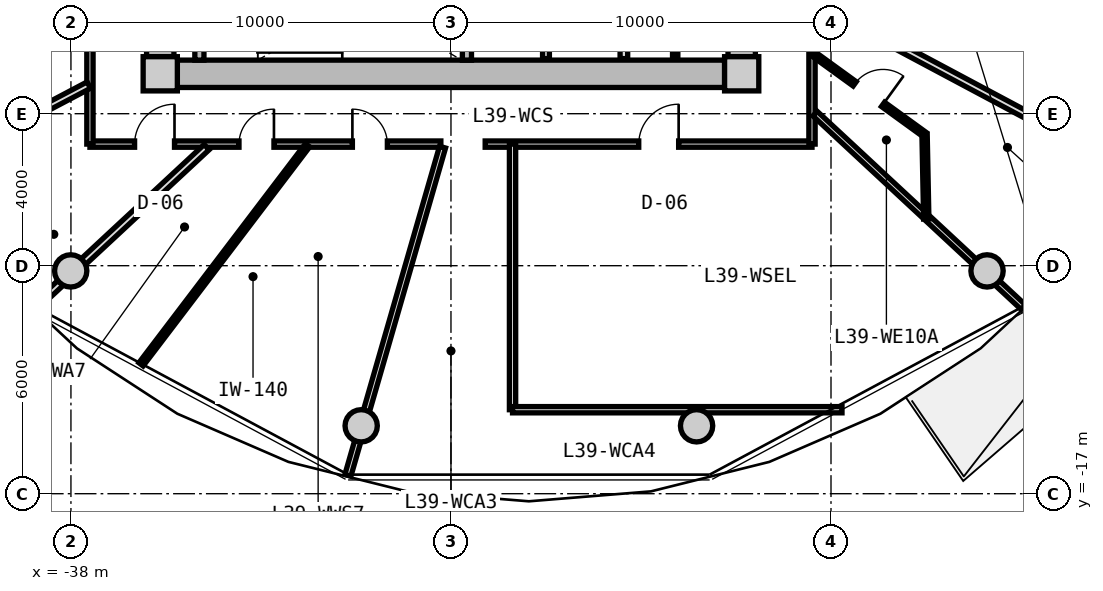
"""IFC4 building model, lengths in metres.
Left out: names, types, materials, properties, quantities, classifications, styles, units other than length and angle.
Written with IfcOpenShell. Run it as: python <this file> out.ifc"""

import sys

from ifc_helpers import new_model, si_unit, direction, frame, frame_2d, origin, origin_2d, place, context, subcontext, project, spatial, rectangle, circle, extrude, source, transform, mapped, element, fill, save


model = new_model("IFC4")
c1 = context("Model", 3, precision=1e-05, world=origin(), true_north=direction((0.0, 1.0)))
c2 = subcontext(c1, "Body", "Model", "MODEL_VIEW")
j1 = project(units=[si_unit("LENGTHUNIT", "METRE"), si_unit("PLANEANGLEUNIT", "RADIAN")], contexts=[c1])
p1 = place(None, origin())
s1 = spatial("IfcSite", under=j1, at=p1, CompositionType="ELEMENT")
p2 = place(p1, origin())
s2 = spatial("IfcBuilding", under=s1, at=p2, CompositionType="ELEMENT")
p3 = place(p2, frame((0.0, 0.0, 126.75)))
s3 = spatial("IfcBuildingStorey", under=s2, at=p3, CompositionType="ELEMENT", Elevation=126.75)
m1 = source(origin(), c2, "Body", "SweptSolid", [
    extrude(rectangle(XDim=0.9, YDim=0.9, at=origin_2d()), origin(), (0.0, 0.0, 1.0), 3.05),
])
for number, where, z_axis, x_axis in (
    (1, (-35.65, -5.95, 0.0), (0.0, 0.0, 1.0), (1.0, 0.0, 0.0)),
    (2, (-20.35, -5.95, 0.0), (0.0, 0.0, 1.0), (1.0, 0.0, 0.0)),
):
    element("IfcColumn", number, at=place(p3, frame(where, z_axis=z_axis, x_axis=x_axis)), inside=s3, PredefinedType="COLUMN", context=c2, shape_type="MappedRepresentation", body=[
        mapped(m1, transform((0.0, 0.0, 0.0), x_axis=(1.0, 0.0, 0.0), y_axis=(0.0, 1.0, 0.0), z_axis=(0.0, 0.0, 1.0), scale=1.0)),
    ])
m2 = source(origin(), c2, "Body", "SweptSolid", [
    extrude(rectangle(XDim=14.4, YDim=0.72, at=frame_2d((7.2, 0.0))), origin(), (0.0, 0.0, 1.0), 2.73),
])
p4 = place(p3, frame((-20.8, -5.95, 0.0), z_axis=(0.0, 0.0, 1.0), x_axis=(-1.0, 0.0, 0.0)))
e3 = element("IfcWall", 3, at=p4, inside=s3, PredefinedType="SHEAR", context=c2, shape_type="MappedRepresentation", body=[
    mapped(m2, transform((0.0, 0.0, 0.0), x_axis=(1.0, 0.0, 0.0), y_axis=(0.0, 1.0, 0.0), z_axis=(0.0, 0.0, 1.0), scale=1.0)),
])
m3 = source(origin(), c2, "Body", "SweptSolid", [
    extrude(rectangle(XDim=11.0, YDim=0.72, at=frame_2d((5.5, 0.0))), origin(), (0.0, 0.0, 1.0), 2.73),
])
p5 = place(p3, frame((-35.65, -5.5, 0.0), z_axis=(0.0, 0.0, 1.0), x_axis=(0.0, 1.0, 0.0)))
e4 = element("IfcWall", 4, at=p5, inside=s3, PredefinedType="SHEAR", context=c2, shape_type="MappedRepresentation", body=[
    mapped(m3, transform((0.0, 0.0, 0.0), x_axis=(1.0, 0.0, 0.0), y_axis=(0.0, 1.0, 0.0), z_axis=(0.0, 0.0, 1.0), scale=1.0)),
])
p6 = place(p5, frame((3.8, 0.0, 0.0)))
e5 = element("IfcOpeningElement", 5, at=p6, cuts=e4, PredefinedType="OPENING", context=c2, shape_type="SweptSolid", body=[
    extrude(rectangle(XDim=1.2, YDim=2.15, at=frame_2d((0.6, 1.075))), frame((0.0, 0.37, 0.0), z_axis=(0.0, -1.0, 0.0), x_axis=(1.0, 0.0, 0.0)), (0.0, 0.0, 1.0), 0.74),
])
p7 = place(p3, frame((-20.35, 5.5, 0.0), z_axis=(0.0, 0.0, 1.0), x_axis=(0.0, -1.0, 0.0)))
e6 = element("IfcWall", 6, at=p7, inside=s3, PredefinedType="SHEAR", context=c2, shape_type="MappedRepresentation", body=[
    mapped(m3, transform((0.0, 0.0, 0.0), x_axis=(1.0, 0.0, 0.0), y_axis=(0.0, 1.0, 0.0), z_axis=(0.0, 0.0, 1.0), scale=1.0)),
])
p8 = place(p7, frame((5.65, 0.0, 0.0)))
e7 = element("IfcOpeningElement", 7, at=p8, cuts=e6, PredefinedType="OPENING", context=c2, shape_type="SweptSolid", body=[
    extrude(rectangle(XDim=1.2, YDim=2.15, at=frame_2d((0.6, 1.075))), frame((0.0, 0.37, 0.0), z_axis=(0.0, -1.0, 0.0), x_axis=(1.0, 0.0, 0.0)), (0.0, 0.0, 1.0), 0.74),
])
m4 = source(origin(), c2, "Body", "SweptSolid", [
    extrude(circle(Radius=0.425, at=origin_2d()), origin(), (0.0, 0.0, 1.0), 3.05),
])
for number, where, z_axis, x_axis in (
    (8, (-38.006, -11.137, 0.0), (0.0, 0.0, 1.0), (1.0, 0.0, 0.0)),
    (9, (-30.363, -15.213, 0.0), (0.0, 0.0, 1.0), (1.0, 0.0, 0.0)),
    (10, (-21.537, -15.213, 0.0), (0.0, 0.0, 1.0), (1.0, 0.0, 0.0)),
    (11, (-13.894, -11.137, 0.0), (0.0, 0.0, 1.0), (1.0, 0.0, 0.0)),
):
    element("IfcColumn", number, at=place(p3, frame(where, z_axis=z_axis, x_axis=x_axis)), inside=s3, PredefinedType="COLUMN", context=c2, shape_type="MappedRepresentation", body=[
        mapped(m4, transform((0.0, 0.0, 0.0), x_axis=(1.0, 0.0, 0.0), y_axis=(0.0, 1.0, 0.0), z_axis=(0.0, 0.0, 1.0), scale=1.0)),
    ])
m5 = source(origin(), c2, "Body", "SweptSolid", [
    extrude(rectangle(XDim=3.14, YDim=0.24, at=frame_2d((1.57, 0.0))), origin(), (0.0, 0.0, 1.0), 2.73),
])
for number, where, z_axis, x_axis in (
    (12, (-34.62, -5.59, 0.0), (0.0, 0.0, 1.0), (0.0, 1.0, 0.0)),
    (13, (-27.58, -5.59, 0.0), (0.0, 0.0, 1.0), (0.0, 1.0, 0.0)),
):
    element("IfcWall", number, at=place(p3, frame(where, z_axis=z_axis, x_axis=x_axis)), inside=s3, PredefinedType="PARTITIONING", context=c2, shape_type="MappedRepresentation", body=[
        mapped(m5, transform((0.0, 0.0, 0.0), x_axis=(1.0, 0.0, 0.0), y_axis=(0.0, 1.0, 0.0), z_axis=(0.0, 0.0, 1.0), scale=1.0)),
    ])
m6 = source(origin(), c2, "Body", "SweptSolid", [
    extrude(rectangle(XDim=3.8, YDim=0.2, at=frame_2d((1.9, 0.0))), origin(), (0.0, 0.0, 1.0), 2.715),
])
p9 = place(p3, frame((-23.45, -5.55, 0.0), z_axis=(0.0, 0.0, 1.0), x_axis=(0.0, 1.0, 0.0)))
e14 = element("IfcWall", 14, at=p9, inside=s3, PredefinedType="PARTITIONING", context=c2, shape_type="MappedRepresentation", body=[
    mapped(m6, transform((0.0, 0.0, 0.0), x_axis=(1.0, 0.0, 0.0), y_axis=(0.0, 1.0, 0.0), z_axis=(0.0, 0.0, 1.0), scale=1.0)),
])
m7 = source(origin(), c2, "Body", "SweptSolid", [
    extrude(rectangle(XDim=3.22, YDim=0.18, at=frame_2d((1.61, 0.0))), origin(), (0.0, 0.0, 1.0), 2.715),
])
p10 = place(p3, frame((-25.5, -5.55, 0.0), z_axis=(0.0, 0.0, 1.0), x_axis=(0.0, 1.0, 0.0)))
e15 = element("IfcWall", 15, at=p10, inside=s3, PredefinedType="PARTITIONING", context=c2, shape_type="MappedRepresentation", body=[
    mapped(m7, transform((0.0, 0.0, 0.0), x_axis=(1.0, 0.0, 0.0), y_axis=(0.0, 1.0, 0.0), z_axis=(0.0, 0.0, 1.0), scale=1.0)),
])
m8 = source(origin(), c2, "Body", "SweptSolid", [
    extrude(rectangle(XDim=3.8, YDim=0.14, at=frame_2d((1.9, 0.0))), origin(), (0.0, 0.0, 1.0), 2.715),
])
p11 = place(p3, frame((-22.1, -5.55, 0.0), z_axis=(0.0, 0.0, 1.0), x_axis=(0.0, 1.0, 0.0)))
e16 = element("IfcWall", 16, at=p11, inside=s3, PredefinedType="PARTITIONING", context=c2, shape_type="MappedRepresentation", body=[
    mapped(m8, transform((0.0, 0.0, 0.0), x_axis=(1.0, 0.0, 0.0), y_axis=(0.0, 1.0, 0.0), z_axis=(0.0, 0.0, 1.0), scale=1.0)),
])
m9 = source(origin(), c2, "Body", "SweptSolid", [
    extrude(rectangle(XDim=8.6, YDim=0.165, at=frame_2d((4.3, 0.0))), origin(), (0.0, 0.0, 1.0), 2.715),
])
p12 = place(p3, frame((-18.5, -7.8, 0.0), z_axis=(0.0, 0.0, 1.0), x_axis=(-1.0, 0.0, 0.0)))
e17 = element("IfcWall", 17, at=p12, inside=s3, PredefinedType="PARTITIONING", context=c2, shape_type="MappedRepresentation", body=[
    mapped(m9, transform((0.0, 0.0, 0.0), x_axis=(1.0, 0.0, 0.0), y_axis=(0.0, 1.0, 0.0), z_axis=(0.0, 0.0, 1.0), scale=1.0)),
])
p13 = place(p12, frame((3.509, 0.0, 0.0)))
e18 = element("IfcOpeningElement", 18, at=p13, cuts=e17, PredefinedType="OPENING", context=c2, shape_type="SweptSolid", body=[
    extrude(rectangle(XDim=1.05, YDim=2.15, at=frame_2d((0.525, 1.075))), frame((0.0, 0.093, 0.0), z_axis=(0.0, -1.0, 0.0), x_axis=(1.0, 0.0, 0.0)), (0.0, 0.0, 1.0), 0.185),
])
m10 = source(origin(), c2, "Body", "SweptSolid", [
    extrude(rectangle(XDim=9.234, YDim=0.165, at=frame_2d((4.617, 0.0))), origin(), (0.0, 0.0, 1.0), 2.715),
])
p14 = place(p3, frame((-28.266, -7.8, 0.0), z_axis=(0.0, 0.0, 1.0), x_axis=(-1.0, 0.0, 0.0)))
e19 = element("IfcWall", 19, at=p14, inside=s3, PredefinedType="PARTITIONING", context=c2, shape_type="MappedRepresentation", body=[
    mapped(m10, transform((0.0, 0.0, 0.0), x_axis=(1.0, 0.0, 0.0), y_axis=(0.0, 1.0, 0.0), z_axis=(0.0, 0.0, 1.0), scale=1.0)),
])
p15 = place(p14, frame((7.009, 0.0, 0.0)))
e20 = element("IfcOpeningElement", 20, at=p15, cuts=e19, PredefinedType="OPENING", context=c2, shape_type="SweptSolid", body=[
    extrude(rectangle(XDim=1.05, YDim=2.15, at=frame_2d((0.525, 1.075))), frame((0.0, 0.093, 0.0), z_axis=(0.0, -1.0, 0.0), x_axis=(1.0, 0.0, 0.0)), (0.0, 0.0, 1.0), 0.185),
])
p16 = place(p14, frame((4.392, 0.0, 0.0)))
e21 = element("IfcOpeningElement", 21, at=p16, cuts=e19, PredefinedType="OPENING", context=c2, shape_type="SweptSolid", body=[
    extrude(rectangle(XDim=0.92, YDim=2.1, at=frame_2d((0.46, 1.05))), frame((0.0, 0.093, 0.0), z_axis=(0.0, -1.0, 0.0), x_axis=(1.0, 0.0, 0.0)), (0.0, 0.0, 1.0), 0.185),
])
p17 = place(p14, frame((1.408, 0.0, 0.0)))
e22 = element("IfcOpeningElement", 22, at=p17, cuts=e19, PredefinedType="OPENING", context=c2, shape_type="SweptSolid", body=[
    extrude(rectangle(XDim=0.92, YDim=2.1, at=frame_2d((0.46, 1.05))), frame((0.0, 0.093, 0.0), z_axis=(0.0, -1.0, 0.0), x_axis=(1.0, 0.0, 0.0)), (0.0, 0.0, 1.0), 0.185),
])
m11 = source(origin(), c2, "Body", "SweptSolid", [
    extrude(rectangle(XDim=15.6, YDim=0.165, at=frame_2d((7.8, 0.0))), origin(), (0.0, 0.0, 1.0), 2.715),
])
p18 = place(p3, frame((-37.5, -7.8, 0.0), z_axis=(0.0, 0.0, 1.0), x_axis=(0.0, 1.0, 0.0)))
e23 = element("IfcWall", 23, at=p18, inside=s3, PredefinedType="PARTITIONING", context=c2, shape_type="MappedRepresentation", body=[
    mapped(m11, transform((0.0, 0.0, 0.0), x_axis=(1.0, 0.0, 0.0), y_axis=(0.0, 1.0, 0.0), z_axis=(0.0, 0.0, 1.0), scale=1.0)),
])
p19 = place(p18, frame((11.994, 0.0, 0.0)))
e24 = element("IfcOpeningElement", 24, at=p19, cuts=e23, PredefinedType="OPENING", context=c2, shape_type="SweptSolid", body=[
    extrude(rectangle(XDim=1.25, YDim=2.2, at=frame_2d((0.625, 1.1))), frame((0.0, 0.093, 0.0), z_axis=(0.0, -1.0, 0.0), x_axis=(1.0, 0.0, 0.0)), (0.0, 0.0, 1.0), 0.185),
])
p20 = place(p18, frame((7.984, 0.0, 0.0)))
e25 = element("IfcOpeningElement", 25, at=p20, cuts=e23, PredefinedType="OPENING", context=c2, shape_type="SweptSolid", body=[
    extrude(rectangle(XDim=1.05, YDim=2.15, at=frame_2d((0.525, 1.075))), frame((0.0, 0.093, 0.0), z_axis=(0.0, -1.0, 0.0), x_axis=(1.0, 0.0, 0.0)), (0.0, 0.0, 1.0), 0.185),
])
p21 = place(p18, frame((5.777, 0.0, 0.0)))
e26 = element("IfcOpeningElement", 26, at=p21, cuts=e23, PredefinedType="OPENING", context=c2, shape_type="SweptSolid", body=[
    extrude(rectangle(XDim=1.05, YDim=2.15, at=frame_2d((0.525, 1.075))), frame((0.0, 0.093, 0.0), z_axis=(0.0, -1.0, 0.0), x_axis=(1.0, 0.0, 0.0)), (0.0, 0.0, 1.0), 0.185),
])
p22 = place(p18, frame((2.676, 0.0, 0.0)))
e27 = element("IfcOpeningElement", 27, at=p22, cuts=e23, PredefinedType="OPENING", context=c2, shape_type="SweptSolid", body=[
    extrude(rectangle(XDim=1.05, YDim=2.15, at=frame_2d((0.525, 1.075))), frame((0.0, 0.093, 0.0), z_axis=(0.0, -1.0, 0.0), x_axis=(1.0, 0.0, 0.0)), (0.0, 0.0, 1.0), 0.185),
])
p23 = place(p3, frame((-18.5, 7.8, 0.0), z_axis=(0.0, 0.0, 1.0), x_axis=(0.0, -1.0, 0.0)))
e28 = element("IfcWall", 28, at=p23, inside=s3, PredefinedType="PARTITIONING", context=c2, shape_type="MappedRepresentation", body=[
    mapped(m11, transform((0.0, 0.0, 0.0), x_axis=(1.0, 0.0, 0.0), y_axis=(0.0, 1.0, 0.0), z_axis=(0.0, 0.0, 1.0), scale=1.0)),
])
p24 = place(p23, frame((12.002, 0.0, 0.0)))
e29 = element("IfcOpeningElement", 29, at=p24, cuts=e28, PredefinedType="OPENING", context=c2, shape_type="SweptSolid", body=[
    extrude(rectangle(XDim=1.05, YDim=2.15, at=frame_2d((0.525, 1.075))), frame((0.0, 0.093, 0.0), z_axis=(0.0, -1.0, 0.0), x_axis=(1.0, 0.0, 0.0)), (0.0, 0.0, 1.0), 0.185),
])
p25 = place(p23, frame((10.211, 0.0, 0.0)))
e30 = element("IfcOpeningElement", 30, at=p25, cuts=e28, PredefinedType="OPENING", context=c2, shape_type="SweptSolid", body=[
    extrude(rectangle(XDim=1.05, YDim=2.15, at=frame_2d((0.525, 1.075))), frame((0.0, 0.093, 0.0), z_axis=(0.0, -1.0, 0.0), x_axis=(1.0, 0.0, 0.0)), (0.0, 0.0, 1.0), 0.185),
])
p26 = place(p23, frame((7.722, 0.0, 0.0)))
e31 = element("IfcOpeningElement", 31, at=p26, cuts=e28, PredefinedType="OPENING", context=c2, shape_type="SweptSolid", body=[
    extrude(rectangle(XDim=1.05, YDim=2.15, at=frame_2d((0.525, 1.075))), frame((0.0, 0.093, 0.0), z_axis=(0.0, -1.0, 0.0), x_axis=(1.0, 0.0, 0.0)), (0.0, 0.0, 1.0), 0.185),
])
p27 = place(p23, frame((6.291, 0.0, 0.0)))
e32 = element("IfcOpeningElement", 32, at=p27, cuts=e28, PredefinedType="OPENING", context=c2, shape_type="SweptSolid", body=[
    extrude(rectangle(XDim=1.05, YDim=2.15, at=frame_2d((0.525, 1.075))), frame((0.0, 0.093, 0.0), z_axis=(0.0, -1.0, 0.0), x_axis=(1.0, 0.0, 0.0)), (0.0, 0.0, 1.0), 0.185),
])
p28 = place(p23, frame((4.296, 0.0, 0.0)))
e33 = element("IfcOpeningElement", 33, at=p28, cuts=e28, PredefinedType="OPENING", context=c2, shape_type="SweptSolid", body=[
    extrude(rectangle(XDim=1.05, YDim=2.15, at=frame_2d((0.525, 1.075))), frame((0.0, 0.093, 0.0), z_axis=(0.0, -1.0, 0.0), x_axis=(1.0, 0.0, 0.0)), (0.0, 0.0, 1.0), 0.185),
])
p29 = place(p23, frame((1.654, 0.0, 0.0)))
e34 = element("IfcOpeningElement", 34, at=p29, cuts=e28, PredefinedType="OPENING", context=c2, shape_type="SweptSolid", body=[
    extrude(rectangle(XDim=1.05, YDim=2.15, at=frame_2d((0.525, 1.075))), frame((0.0, 0.093, 0.0), z_axis=(0.0, -1.0, 0.0), x_axis=(1.0, 0.0, 0.0)), (0.0, 0.0, 1.0), 0.185),
])
m12 = source(origin(), c2, "Body", "SweptSolid", [
    extrude(rectangle(XDim=8.989, YDim=0.165, at=frame_2d((4.495, 0.0))), origin(), (0.0, 0.0, 1.0), 2.215),
])
p30 = place(p3, frame((-28.222, -7.88, 0.0), z_axis=(0.0, 0.0, 1.0), x_axis=(-0.27702323008, -0.960863221274, 0.0)))
e35 = element("IfcWall", 35, at=p30, inside=s3, PredefinedType="PARTITIONING", context=c2, shape_type="MappedRepresentation", body=[
    mapped(m12, transform((0.0, 0.0, 0.0), x_axis=(1.0, 0.0, 0.0), y_axis=(0.0, 1.0, 0.0), z_axis=(0.0, 0.0, 1.0), scale=1.0)),
])
m13 = source(origin(), c2, "Body", "SweptSolid", [
    extrude(rectangle(XDim=7.482, YDim=0.165, at=frame_2d((3.741, 0.0))), origin(), (0.0, 0.0, 1.0), 2.215),
])
p31 = place(p3, frame((-18.42, -6.998, 0.0), z_axis=(0.0, 0.0, 1.0), x_axis=(0.732508698043, -0.680757671489, 0.0)))
e36 = element("IfcWall", 36, at=p31, inside=s3, PredefinedType="PARTITIONING", context=c2, shape_type="MappedRepresentation", body=[
    mapped(m13, transform((0.0, 0.0, 0.0), x_axis=(1.0, 0.0, 0.0), y_axis=(0.0, 1.0, 0.0), z_axis=(0.0, 0.0, 1.0), scale=1.0)),
])
m14 = source(origin(), c2, "Body", "SweptSolid", [
    extrude(rectangle(XDim=6.99, YDim=0.165, at=frame_2d((3.495, 0.0))), origin(), (0.0, 0.0, 1.0), 2.715),
])
p32 = place(p3, frame((-26.38, -14.79, 0.0), z_axis=(0.0, 0.0, 1.0), x_axis=(0.0, 1.0, 0.0)))
e37 = element("IfcWall", 37, at=p32, inside=s3, PredefinedType="PARTITIONING", context=c2, shape_type="MappedRepresentation", body=[
    mapped(m14, transform((0.0, 0.0, 0.0), x_axis=(1.0, 0.0, 0.0), y_axis=(0.0, 1.0, 0.0), z_axis=(0.0, 0.0, 1.0), scale=1.0)),
])
m15 = source(origin(), c2, "Body", "SweptSolid", [
    extrude(rectangle(XDim=8.669, YDim=0.165, at=frame_2d((4.335, 0.0))), origin(), (0.0, 0.0, 1.0), 2.715),
])
p33 = place(p3, frame((-26.38, -14.79, 0.0), z_axis=(0.0, 0.0, 1.0), x_axis=(1.0, 0.0, 0.0)))
e38 = element("IfcWall", 38, at=p33, inside=s3, PredefinedType="PARTITIONING", context=c2, shape_type="MappedRepresentation", body=[
    mapped(m15, transform((0.0, 0.0, 0.0), x_axis=(1.0, 0.0, 0.0), y_axis=(0.0, 1.0, 0.0), z_axis=(0.0, 0.0, 1.0), scale=1.0)),
])
m16 = source(origin(), c2, "Body", "SweptSolid", [
    extrude(rectangle(XDim=6.187, YDim=0.19, at=frame_2d((3.093, 0.0))), origin(), (0.0, 0.0, 1.0), 2.215),
])
p34 = place(p3, frame((-34.429, -7.88, 0.0), z_axis=(0.0, 0.0, 1.0), x_axis=(-0.732501077882, -0.680765870841, 0.0)))
e39 = element("IfcWall", 39, at=p34, inside=s3, PredefinedType="PARTITIONING", context=c2, shape_type="MappedRepresentation", body=[
    mapped(m16, transform((0.0, 0.0, 0.0), x_axis=(1.0, 0.0, 0.0), y_axis=(0.0, 1.0, 0.0), z_axis=(0.0, 0.0, 1.0), scale=1.0)),
])
m17 = source(origin(), c2, "Body", "SweptSolid", [
    extrude(rectangle(XDim=4.31, YDim=0.19, at=frame_2d((2.155, 0.0))), origin(), (0.0, 0.0, 1.0), 2.715),
])
p35 = place(p3, frame((-37.53, -6.248, 0.0), z_axis=(0.0, 0.0, 1.0), x_axis=(-0.884459441503, -0.466617076773, 0.0)))
e40 = element("IfcWall", 40, at=p35, inside=s3, PredefinedType="PARTITIONING", context=c2, shape_type="MappedRepresentation", body=[
    mapped(m17, transform((0.0, 0.0, 0.0), x_axis=(1.0, 0.0, 0.0), y_axis=(0.0, 1.0, 0.0), z_axis=(0.0, 0.0, 1.0), scale=1.0)),
])
m18 = source(origin(), c2, "Body", "SweptSolid", [
    extrude(rectangle(XDim=7.243, YDim=0.14, at=frame_2d((3.621, 0.0))), origin(), (0.0, 0.0, 1.0), 2.715),
])
p36 = place(p3, frame((-31.774, -7.83, 0.0), z_axis=(0.0, 0.0, 1.0), x_axis=(-0.605111472002, -0.796140757939, 0.0)))
e41 = element("IfcWall", 41, at=p36, inside=s3, PredefinedType="PARTITIONING", context=c2, shape_type="MappedRepresentation", body=[
    mapped(m18, transform((0.0, 0.0, 0.0), x_axis=(1.0, 0.0, 0.0), y_axis=(0.0, 1.0, 0.0), z_axis=(0.0, 0.0, 1.0), scale=1.0)),
])
m19 = source(origin(), c2, "Body", "SweptSolid", [
    extrude(rectangle(XDim=8.744, YDim=0.19, at=frame_2d((4.372, 0.0))), origin(), (0.0, 0.0, 1.0), 2.715),
])
p37 = place(p3, frame((-18.273, -4.142, 0.0), z_axis=(0.0, 0.0, 1.0), x_axis=(0.882252449936, -0.470776607938, 0.0)))
e42 = element("IfcWall", 42, at=p37, inside=s3, PredefinedType="PARTITIONING", context=c2, shape_type="MappedRepresentation", body=[
    mapped(m19, transform((0.0, 0.0, 0.0), x_axis=(1.0, 0.0, 0.0), y_axis=(0.0, 1.0, 0.0), z_axis=(0.0, 0.0, 1.0), scale=1.0)),
])
m20 = source(origin(), c2, "Body", "SweptSolid", [
    extrude(rectangle(XDim=3.621, YDim=0.14, at=frame_2d((1.811, 0.0))), origin(), (0.0, 0.0, 1.0), 2.715),
])
p38 = place(p3, frame((-18.47, -5.422, 0.0), z_axis=(0.0, 0.0, 1.0), x_axis=(0.80968252222, -0.586868139544, 0.0)))
e43 = element("IfcWall", 43, at=p38, inside=s3, PredefinedType="PARTITIONING", context=c2, shape_type="MappedRepresentation", body=[
    mapped(m20, transform((0.0, 0.0, 0.0), x_axis=(1.0, 0.0, 0.0), y_axis=(0.0, 1.0, 0.0), z_axis=(0.0, 0.0, 1.0), scale=1.0)),
])
p39 = place(p38, frame((1.351, 0.0, 0.0)))
e44 = element("IfcOpeningElement", 44, at=p39, cuts=e43, PredefinedType="OPENING", context=c2, shape_type="SweptSolid", body=[
    extrude(rectangle(XDim=0.92, YDim=2.1, at=frame_2d((0.46, 1.05))), frame((0.0, 0.08, 0.0), z_axis=(0.0, -1.0, 0.0), x_axis=(1.0, 0.0, 0.0)), (0.0, 0.0, 1.0), 0.16),
])
m21 = source(origin(), c2, "Body", "SweptSolid", [
    extrude(rectangle(XDim=2.225, YDim=0.14, at=frame_2d((1.112, 0.0))), origin(), (0.0, 0.0, 1.0), 2.715),
])
p40 = place(p3, frame((-15.538, -7.547, 0.0), z_axis=(0.0, 0.0, 1.0), x_axis=(0.019971869027, -0.999800542332, 0.0)))
e45 = element("IfcWall", 45, at=p40, inside=s3, PredefinedType="PARTITIONING", context=c2, shape_type="MappedRepresentation", body=[
    mapped(m21, transform((0.0, 0.0, 0.0), x_axis=(1.0, 0.0, 0.0), y_axis=(0.0, 1.0, 0.0), z_axis=(0.0, 0.0, 1.0), scale=1.0)),
])
m22 = source(origin(), c2, "Body", "SweptSolid", [
    extrude(rectangle(XDim=1.05, YDim=2.15, at=frame_2d((0.525, 1.075))), frame((0.0, 0.025, 0.0), z_axis=(0.0, -1.0, 0.0), x_axis=(1.0, 0.0, 0.0)), (0.0, 0.0, 1.0), 0.05),
])
p41 = place(p13, frame((1.05, 0.0, 0.0), z_axis=(0.0, 0.0, 1.0), x_axis=(-1.0, 0.0, 0.0)))
e46 = element("IfcDoor", 46, at=p41, inside=s3, OperationType="SINGLE_SWING_RIGHT", PredefinedType="DOOR", context=c2, shape_type="MappedRepresentation", body=[
    mapped(m22, transform((0.0, 0.0, 0.0), x_axis=(1.0, 0.0, 0.0), y_axis=(0.0, 1.0, 0.0), z_axis=(0.0, 0.0, 1.0), scale=1.0)),
])
fill(e18, e46)
p42 = place(p15, frame((1.05, 0.0, 0.0), z_axis=(0.0, 0.0, 1.0), x_axis=(-1.0, 0.0, 0.0)))
e47 = element("IfcDoor", 47, at=p42, inside=s3, OperationType="SINGLE_SWING_RIGHT", PredefinedType="DOOR", context=c2, shape_type="MappedRepresentation", body=[
    mapped(m22, transform((0.0, 0.0, 0.0), x_axis=(1.0, 0.0, 0.0), y_axis=(0.0, 1.0, 0.0), z_axis=(0.0, 0.0, 1.0), scale=1.0)),
])
fill(e20, e47)
m23 = source(origin(), c2, "Body", "SweptSolid", [
    extrude(rectangle(XDim=0.92, YDim=2.1, at=frame_2d((0.46, 1.05))), frame((0.0, 0.025, 0.0), z_axis=(0.0, -1.0, 0.0), x_axis=(1.0, 0.0, 0.0)), (0.0, 0.0, 1.0), 0.05),
])
p43 = place(p16, frame((0.92, 0.0, 0.0), z_axis=(0.0, 0.0, 1.0), x_axis=(-1.0, 0.0, 0.0)))
e48 = element("IfcDoor", 48, at=p43, inside=s3, OperationType="SINGLE_SWING_RIGHT", PredefinedType="DOOR", context=c2, shape_type="MappedRepresentation", body=[
    mapped(m23, transform((0.0, 0.0, 0.0), x_axis=(1.0, 0.0, 0.0), y_axis=(0.0, 1.0, 0.0), z_axis=(0.0, 0.0, 1.0), scale=1.0)),
])
fill(e21, e48)
p44 = place(p17, frame((0.92, 0.0, 0.0), z_axis=(0.0, 0.0, 1.0), x_axis=(-1.0, 0.0, 0.0)))
e49 = element("IfcDoor", 49, at=p44, inside=s3, OperationType="SINGLE_SWING_LEFT", PredefinedType="DOOR", context=c2, shape_type="MappedRepresentation", body=[
    mapped(m23, transform((0.0, 0.0, 0.0), x_axis=(1.0, 0.0, 0.0), y_axis=(0.0, 1.0, 0.0), z_axis=(0.0, 0.0, 1.0), scale=1.0)),
])
fill(e22, e49)
p45 = place(p39, origin())
e50 = element("IfcDoor", 50, at=p45, inside=s3, OperationType="SINGLE_SWING_RIGHT", PredefinedType="DOOR", context=c2, shape_type="MappedRepresentation", body=[
    mapped(m23, transform((0.0, 0.0, 0.0), x_axis=(1.0, 0.0, 0.0), y_axis=(0.0, 1.0, 0.0), z_axis=(0.0, 0.0, 1.0), scale=1.0)),
])
fill(e44, e50)
save(model, sys.argv[1])
